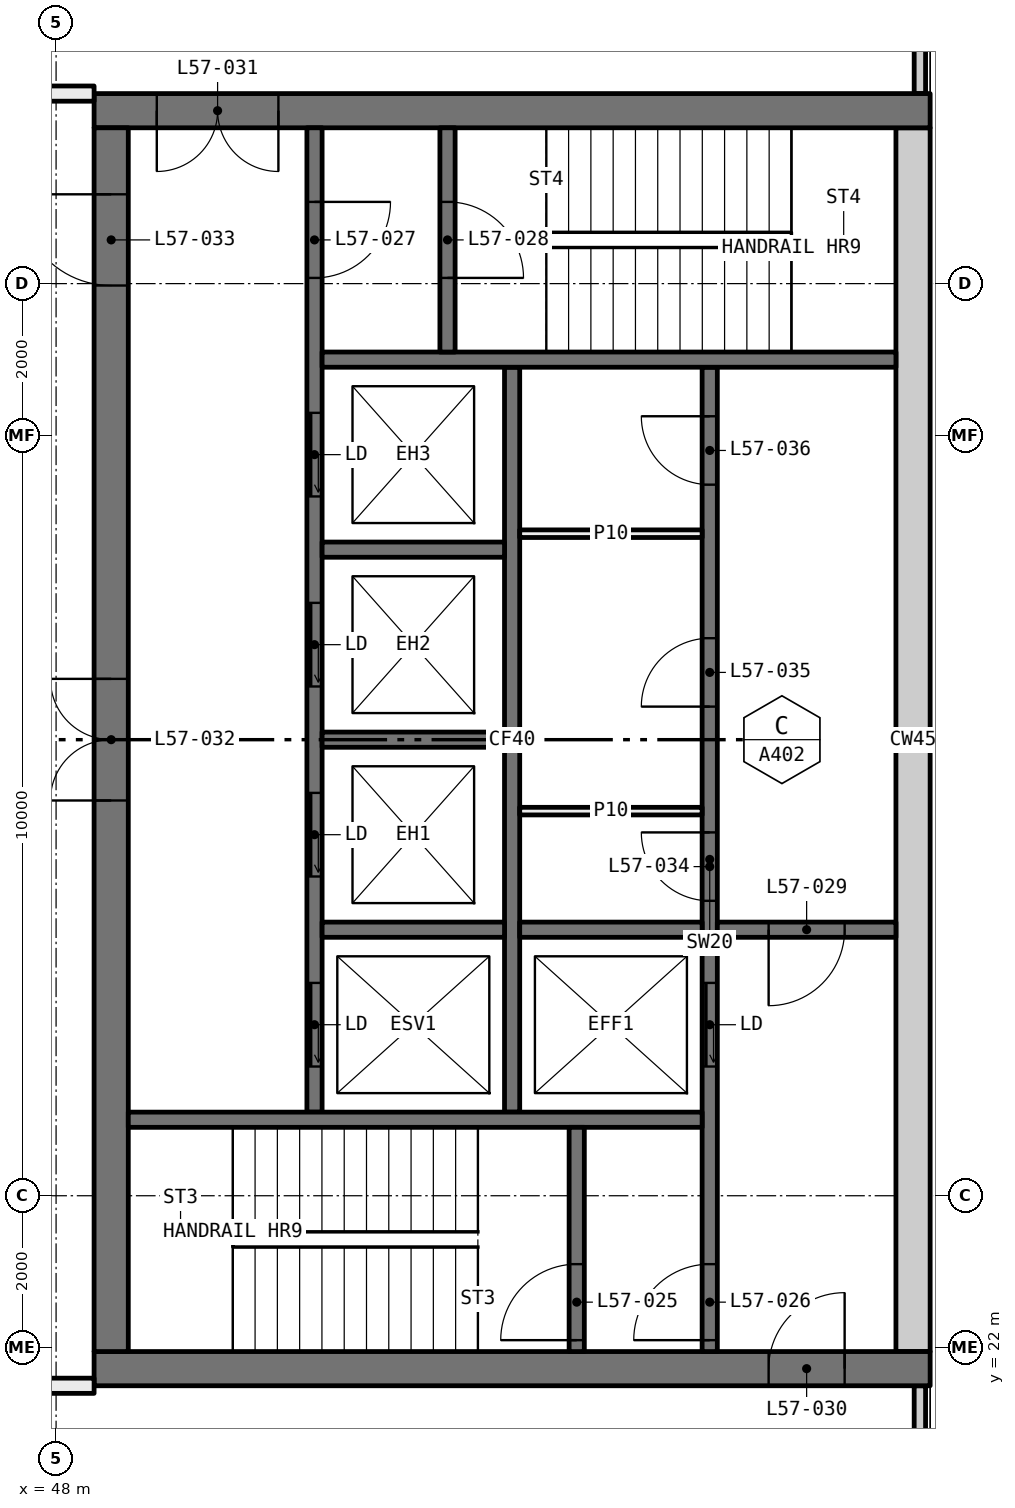
"""IFC4 building model, lengths in metres.
Left out: names, types, materials, properties, quantities, classifications, styles, units other than length and angle.
Written with IfcOpenShell. Run it as: python <this file> out.ifc"""

import sys

from ifc_helpers import new_model, si_unit, direction, frame, frame_2d, origin, place, context, subcontext, project, spatial, rectangle, extrude, element, fill, save


model = new_model("IFC4")
c1 = context("Model", 3, precision=1e-05, world=origin(), true_north=direction((0.0, 1.0)))
c2 = subcontext(c1, "Body", "Model", "MODEL_VIEW")
j1 = project(units=[si_unit("LENGTHUNIT", "METRE"), si_unit("PLANEANGLEUNIT", "RADIAN")], contexts=[c1])
p1 = place(None, origin())
s1 = spatial("IfcSite", under=j1, at=p1, CompositionType="ELEMENT")
p2 = place(p1, origin())
s2 = spatial("IfcBuilding", under=s1, at=p2, CompositionType="ELEMENT")
p3 = place(p2, frame((0.0, 0.0, 213.45)))
s3 = spatial("IfcBuildingStorey", under=s2, at=p3, CompositionType="ELEMENT", Elevation=213.45)
for number, where, z_axis, x_axis in (
    (1, (59.365, 18.71, 0.0), (0.0, 0.0, 1.0), (0.0, 1.0, 0.0)),
    (2, (59.365, 38.5, 0.0), (0.0, 0.0, 1.0), (0.0, 1.0, 0.0)),
):
    element("IfcWall", number, at=place(p3, frame(where, z_axis=z_axis, x_axis=x_axis)), inside=s3, PredefinedType="ELEMENTEDWALL", context=c2, shape_type="SweptSolid", body=[
        extrude(rectangle(XDim=2.79, YDim=0.15, at=frame_2d((1.395, 0.0))), origin(), (0.0, 0.0, 1.0), 4.1),
    ])
p4 = place(p3, frame((48.5, 21.5, 0.0), z_axis=(0.0, 0.0, 1.0), x_axis=(-1.0, 0.0, 0.0)))
e3 = element("IfcWall", 3, at=p4, inside=s3, PredefinedType="PARTITIONING", context=c2, shape_type="SweptSolid", body=[
    extrude(rectangle(XDim=6.0, YDim=0.2, at=frame_2d((3.0, 0.0))), origin(), (0.0, 0.0, 1.0), 4.1),
])
p5 = place(p3, frame((42.6, 38.5, 0.0), z_axis=(0.0, 0.0, 1.0), x_axis=(1.0, 0.0, 0.0)))
e4 = element("IfcWall", 4, at=p5, inside=s3, PredefinedType="PARTITIONING", context=c2, shape_type="SweptSolid", body=[
    extrude(rectangle(XDim=5.9, YDim=0.2, at=frame_2d((2.95, 0.0))), origin(), (0.0, 0.0, 1.0), 4.1),
])
p6 = place(p3, frame((59.5, 21.725, 0.0), z_axis=(0.0, 0.0, 1.0), x_axis=(-1.0, 0.0, 0.0)))
e5 = element("IfcWall", 5, at=p6, inside=s3, PredefinedType="SHEAR", context=c2, shape_type="SweptSolid", body=[
    extrude(rectangle(XDim=11.0, YDim=0.45, at=frame_2d((5.5, 0.0))), origin(), (0.0, 0.0, 1.0), 4.1),
])
p7 = place(p6, frame((1.125, 0.0, 0.0)))
e6 = element("IfcOpeningElement", 6, at=p7, cuts=e5, PredefinedType="OPENING", context=c2, shape_type="SweptSolid", body=[
    extrude(rectangle(XDim=1.0, YDim=2.1, at=frame_2d((0.5, 1.05))), frame((0.0, 0.235, 0.0), z_axis=(0.0, -1.0, 0.0), x_axis=(1.0, 0.0, 0.0)), (0.0, 0.0, 1.0), 0.47),
])
p8 = place(p3, frame((59.5, 38.275, 0.0), z_axis=(0.0, 0.0, 1.0), x_axis=(-1.0, 0.0, 0.0)))
e7 = element("IfcWall", 7, at=p8, inside=s3, PredefinedType="SHEAR", context=c2, shape_type="SweptSolid", body=[
    extrude(rectangle(XDim=11.0, YDim=0.45, at=frame_2d((5.5, 0.0))), origin(), (0.0, 0.0, 1.0), 4.1),
])
p9 = place(p8, frame((8.575, 0.0, 0.0)))
e8 = element("IfcOpeningElement", 8, at=p9, cuts=e7, PredefinedType="OPENING", context=c2, shape_type="SweptSolid", body=[
    extrude(rectangle(XDim=1.6, YDim=2.1, at=frame_2d((0.8, 1.05))), frame((0.0, 0.235, 0.0), z_axis=(0.0, -1.0, 0.0), x_axis=(1.0, 0.0, 0.0)), (0.0, 0.0, 1.0), 0.47),
])
p10 = place(p3, frame((59.275, 21.95, 0.0), z_axis=(0.0, 0.0, 1.0), x_axis=(0.0, 1.0, 0.0)))
e9 = element("IfcWall", 9, at=p10, inside=s3, PredefinedType="SHEAR", context=c2, shape_type="SweptSolid", body=[
    extrude(rectangle(XDim=16.1, YDim=0.45, at=frame_2d((8.05, 0.0))), origin(), (0.0, 0.0, 1.0), 4.1),
])
p11 = place(p3, frame((48.725, 21.95, 0.0), z_axis=(0.0, 0.0, 1.0), x_axis=(0.0, 1.0, 0.0)))
e10 = element("IfcWall", 10, at=p11, inside=s3, PredefinedType="SHEAR", context=c2, shape_type="SweptSolid", body=[
    extrude(rectangle(XDim=16.1, YDim=0.45, at=frame_2d((8.05, 0.0))), origin(), (0.0, 0.0, 1.0), 4.1),
])
p12 = place(p11, frame((7.25, 0.0, 0.0)))
e11 = element("IfcOpeningElement", 11, at=p12, cuts=e10, PredefinedType="OPENING", context=c2, shape_type="SweptSolid", body=[
    extrude(rectangle(XDim=1.6, YDim=2.1, at=frame_2d((0.8, 1.05))), frame((0.0, 0.235, 0.0), z_axis=(0.0, -1.0, 0.0), x_axis=(1.0, 0.0, 0.0)), (0.0, 0.0, 1.0), 0.47),
])
p13 = place(p11, frame((14.025, 0.0, 0.0)))
e12 = element("IfcOpeningElement", 12, at=p13, cuts=e10, PredefinedType="OPENING", context=c2, shape_type="SweptSolid", body=[
    extrude(rectangle(XDim=1.2, YDim=2.1, at=frame_2d((0.6, 1.05))), frame((0.0, 0.235, 0.0), z_axis=(0.0, -1.0, 0.0), x_axis=(1.0, 0.0, 0.0)), (0.0, 0.0, 1.0), 0.47),
])
p14 = place(p3, frame((56.6, 21.95, 0.0), z_axis=(0.0, 0.0, 1.0), x_axis=(0.0, 1.0, 0.0)))
e13 = element("IfcWall", 13, at=p14, inside=s3, PredefinedType="SOLIDWALL", context=c2, shape_type="SweptSolid", body=[
    extrude(rectangle(XDim=12.95, YDim=0.2, at=frame_2d((6.475, 0.0))), origin(), (0.0, 0.0, 1.0), 4.1),
])
p15 = place(p14, frame((3.75, 0.0, 0.0)))
e14 = element("IfcOpeningElement", 14, at=p15, cuts=e13, PredefinedType="OPENING", context=c2, shape_type="SweptSolid", body=[
    extrude(rectangle(XDim=1.1, YDim=2.1, at=frame_2d((0.55, 1.05))), frame((0.0, 0.11, 0.0), z_axis=(0.0, -1.0, 0.0), x_axis=(1.0, 0.0, 0.0)), (0.0, 0.0, 1.0), 0.22),
])
p16 = place(p14, frame((0.15, 0.0, 0.0)))
e15 = element("IfcOpeningElement", 15, at=p16, cuts=e13, PredefinedType="OPENING", context=c2, shape_type="SweptSolid", body=[
    extrude(rectangle(XDim=1.0, YDim=2.1, at=frame_2d((0.5, 1.05))), frame((0.0, 0.11, 0.0), z_axis=(0.0, -1.0, 0.0), x_axis=(1.0, 0.0, 0.0)), (0.0, 0.0, 1.0), 0.22),
])
p17 = place(p14, frame((5.93, 0.0, 0.0)))
e16 = element("IfcOpeningElement", 16, at=p17, cuts=e13, PredefinedType="OPENING", context=c2, shape_type="SweptSolid", body=[
    extrude(rectangle(XDim=0.9, YDim=2.1, at=frame_2d((0.45, 1.05))), frame((0.0, 0.11, 0.0), z_axis=(0.0, -1.0, 0.0), x_axis=(1.0, 0.0, 0.0)), (0.0, 0.0, 1.0), 0.22),
])
p18 = place(p14, frame((8.485, 0.0, 0.0)))
e17 = element("IfcOpeningElement", 17, at=p18, cuts=e13, PredefinedType="OPENING", context=c2, shape_type="SweptSolid", body=[
    extrude(rectangle(XDim=0.9, YDim=2.1, at=frame_2d((0.45, 1.05))), frame((0.0, 0.11, 0.0), z_axis=(0.0, -1.0, 0.0), x_axis=(1.0, 0.0, 0.0)), (0.0, 0.0, 1.0), 0.22),
])
p19 = place(p14, frame((11.405, 0.0, 0.0)))
e18 = element("IfcOpeningElement", 18, at=p19, cuts=e13, PredefinedType="OPENING", context=c2, shape_type="SweptSolid", body=[
    extrude(rectangle(XDim=0.9, YDim=2.1, at=frame_2d((0.45, 1.05))), frame((0.0, 0.11, 0.0), z_axis=(0.0, -1.0, 0.0), x_axis=(1.0, 0.0, 0.0)), (0.0, 0.0, 1.0), 0.22),
])
p20 = place(p3, frame((51.4, 25.1, 0.0), z_axis=(0.0, 0.0, 1.0), x_axis=(0.0, 1.0, 0.0)))
e19 = element("IfcWall", 19, at=p20, inside=s3, PredefinedType="SOLIDWALL", context=c2, shape_type="SweptSolid", body=[
    extrude(rectangle(XDim=12.95, YDim=0.2, at=frame_2d((6.475, 0.0))), origin(), (0.0, 0.0, 1.0), 4.1),
])
p21 = place(p20, frame((0.6, 0.0, 0.0)))
e20 = element("IfcOpeningElement", 20, at=p21, cuts=e19, PredefinedType="OPENING", context=c2, shape_type="SweptSolid", body=[
    extrude(rectangle(XDim=1.1, YDim=2.1, at=frame_2d((0.55, 1.05))), frame((0.0, 0.11, 0.0), z_axis=(0.0, -1.0, 0.0), x_axis=(1.0, 0.0, 0.0)), (0.0, 0.0, 1.0), 0.22),
])
p22 = place(p20, frame((3.1, 0.0, 0.0)))
e21 = element("IfcOpeningElement", 21, at=p22, cuts=e19, PredefinedType="OPENING", context=c2, shape_type="SweptSolid", body=[
    extrude(rectangle(XDim=1.1, YDim=2.1, at=frame_2d((0.55, 1.05))), frame((0.0, 0.11, 0.0), z_axis=(0.0, -1.0, 0.0), x_axis=(1.0, 0.0, 0.0)), (0.0, 0.0, 1.0), 0.22),
])
p23 = place(p20, frame((5.6, 0.0, 0.0)))
e22 = element("IfcOpeningElement", 22, at=p23, cuts=e19, PredefinedType="OPENING", context=c2, shape_type="SweptSolid", body=[
    extrude(rectangle(XDim=1.1, YDim=2.1, at=frame_2d((0.55, 1.05))), frame((0.0, 0.11, 0.0), z_axis=(0.0, -1.0, 0.0), x_axis=(1.0, 0.0, 0.0)), (0.0, 0.0, 1.0), 0.22),
])
p24 = place(p20, frame((8.1, 0.0, 0.0)))
e23 = element("IfcOpeningElement", 23, at=p24, cuts=e19, PredefinedType="OPENING", context=c2, shape_type="SweptSolid", body=[
    extrude(rectangle(XDim=1.1, YDim=2.1, at=frame_2d((0.55, 1.05))), frame((0.0, 0.11, 0.0), z_axis=(0.0, -1.0, 0.0), x_axis=(1.0, 0.0, 0.0)), (0.0, 0.0, 1.0), 0.22),
])
p25 = place(p20, frame((10.975, 0.0, 0.0)))
e24 = element("IfcOpeningElement", 24, at=p25, cuts=e19, PredefinedType="OPENING", context=c2, shape_type="SweptSolid", body=[
    extrude(rectangle(XDim=1.0, YDim=2.1, at=frame_2d((0.5, 1.05))), frame((0.0, 0.11, 0.0), z_axis=(0.0, -1.0, 0.0), x_axis=(1.0, 0.0, 0.0)), (0.0, 0.0, 1.0), 0.22),
])
p26 = place(p3, frame((54.0, 25.1, 0.0), z_axis=(0.0, 0.0, 1.0), x_axis=(0.0, 1.0, 0.0)))
e25 = element("IfcWall", 25, at=p26, inside=s3, PredefinedType="SOLIDWALL", context=c2, shape_type="SweptSolid", body=[
    extrude(rectangle(XDim=9.8, YDim=0.2, at=frame_2d((4.9, 0.0))), origin(), (0.0, 0.0, 1.0), 4.1),
])
for number, where, z_axis, x_axis in (
    (26, (56.5, 25.0, 0.0), (0.0, 0.0, 1.0), (-1.0, 0.0, 0.0)),
    (27, (59.05, 35.0, 0.0), (0.0, 0.0, 1.0), (-1.0, 0.0, 0.0)),
):
    element("IfcWall", number, at=place(p3, frame(where, z_axis=z_axis, x_axis=x_axis)), inside=s3, PredefinedType="SOLIDWALL", context=c2, shape_type="SweptSolid", body=[
        extrude(rectangle(XDim=7.55, YDim=0.2, at=frame_2d((3.775, 0.0))), origin(), (0.0, 0.0, 1.0), 4.1),
    ])
p27 = place(p3, frame((59.05, 27.5, 0.0), z_axis=(0.0, 0.0, 1.0), x_axis=(-1.0, 0.0, 0.0)))
e28 = element("IfcWall", 28, at=p27, inside=s3, PredefinedType="SOLIDWALL", context=c2, shape_type="SweptSolid", body=[
    extrude(rectangle(XDim=2.35, YDim=0.2, at=frame_2d((1.175, 0.0))), origin(), (0.0, 0.0, 1.0), 4.1),
])
p28 = place(p27, frame((0.675, 0.0, 0.0)))
e29 = element("IfcOpeningElement", 29, at=p28, cuts=e28, PredefinedType="OPENING", context=c2, shape_type="SweptSolid", body=[
    extrude(rectangle(XDim=1.0, YDim=2.1, at=frame_2d((0.5, 1.05))), frame((0.0, 0.11, 0.0), z_axis=(0.0, -1.0, 0.0), x_axis=(1.0, 0.0, 0.0)), (0.0, 0.0, 1.0), 0.22),
])
p29 = place(p3, frame((54.85, 21.95, 0.0), z_axis=(0.0, 0.0, 1.0), x_axis=(0.0, 1.0, 0.0)))
e30 = element("IfcWall", 30, at=p29, inside=s3, PredefinedType="SOLIDWALL", context=c2, shape_type="SweptSolid", body=[
    extrude(rectangle(XDim=2.95, YDim=0.2, at=frame_2d((1.475, 0.0))), origin(), (0.0, 0.0, 1.0), 4.1),
])
p30 = place(p29, frame((0.15, 0.0, 0.0)))
e31 = element("IfcOpeningElement", 31, at=p30, cuts=e30, PredefinedType="OPENING", context=c2, shape_type="SweptSolid", body=[
    extrude(rectangle(XDim=1.0, YDim=2.1, at=frame_2d((0.5, 1.05))), frame((0.0, 0.11, 0.0), z_axis=(0.0, -1.0, 0.0), x_axis=(1.0, 0.0, 0.0)), (0.0, 0.0, 1.0), 0.22),
])
p31 = place(p3, frame((53.15, 35.1, 0.0), z_axis=(0.0, 0.0, 1.0), x_axis=(0.0, 1.0, 0.0)))
e32 = element("IfcWall", 32, at=p31, inside=s3, PredefinedType="SOLIDWALL", context=c2, shape_type="SweptSolid", body=[
    extrude(rectangle(XDim=2.95, YDim=0.2, at=frame_2d((1.475, 0.0))), origin(), (0.0, 0.0, 1.0), 4.1),
])
p32 = place(p31, frame((0.975, 0.0, 0.0)))
e33 = element("IfcOpeningElement", 33, at=p32, cuts=e32, PredefinedType="OPENING", context=c2, shape_type="SweptSolid", body=[
    extrude(rectangle(XDim=1.0, YDim=2.1, at=frame_2d((0.5, 1.05))), frame((0.0, 0.11, 0.0), z_axis=(0.0, -1.0, 0.0), x_axis=(1.0, 0.0, 0.0)), (0.0, 0.0, 1.0), 0.22),
])
for number, where, z_axis, x_axis in (
    (34, (56.5, 27.5, 0.0), (0.0, 0.0, 1.0), (-1.0, 0.0, 0.0)),
    (35, (53.9, 27.5, 0.0), (0.0, 0.0, 1.0), (-1.0, 0.0, 0.0)),
    (36, (53.9, 30.0, 0.0), (0.0, 0.0, 1.0), (-1.0, 0.0, 0.0)),
    (37, (53.9, 32.5, 0.0), (0.0, 0.0, 1.0), (-1.0, 0.0, 0.0)),
):
    element("IfcWall", number, at=place(p3, frame(where, z_axis=z_axis, x_axis=x_axis)), inside=s3, PredefinedType="SOLIDWALL", context=c2, shape_type="SweptSolid", body=[
        extrude(rectangle(XDim=2.4, YDim=0.2, at=frame_2d((1.2, 0.0))), origin(), (0.0, 0.0, 1.0), 4.1),
    ])
for number, where, z_axis, x_axis in (
    (38, (56.5, 29.06, 0.0), (0.0, 0.0, 1.0), (-1.0, 0.0, 0.0)),
    (39, (56.5, 32.71, 0.0), (0.0, 0.0, 1.0), (-1.0, 0.0, 0.0)),
):
    element("IfcWall", number, at=place(p3, frame(where, z_axis=z_axis, x_axis=x_axis)), inside=s3, PredefinedType="PARTITIONING", context=c2, shape_type="SweptSolid", body=[
        extrude(rectangle(XDim=2.4, YDim=0.1, at=frame_2d((1.2, 0.0))), origin(), (0.0, 0.0, 1.0), 4.1),
    ])
p33 = place(p21, origin())
e40 = element("IfcDoor", 40, at=p33, inside=s3, OperationType="SLIDING_TO_LEFT", PredefinedType="DOOR", context=c2, shape_type="SweptSolid", body=[
    extrude(rectangle(XDim=1.1, YDim=2.1, at=frame_2d((0.55, 1.05))), frame((0.0, 0.025, 0.0), z_axis=(0.0, -1.0, 0.0), x_axis=(1.0, 0.0, 0.0)), (0.0, 0.0, 1.0), 0.05),
])
fill(e20, e40)
p34 = place(p22, origin())
e41 = element("IfcDoor", 41, at=p34, inside=s3, OperationType="SLIDING_TO_LEFT", PredefinedType="DOOR", context=c2, shape_type="SweptSolid", body=[
    extrude(rectangle(XDim=1.1, YDim=2.1, at=frame_2d((0.55, 1.05))), frame((0.0, 0.025, 0.0), z_axis=(0.0, -1.0, 0.0), x_axis=(1.0, 0.0, 0.0)), (0.0, 0.0, 1.0), 0.05),
])
fill(e21, e41)
p35 = place(p23, origin())
e42 = element("IfcDoor", 42, at=p35, inside=s3, OperationType="SLIDING_TO_LEFT", PredefinedType="DOOR", context=c2, shape_type="SweptSolid", body=[
    extrude(rectangle(XDim=1.1, YDim=2.1, at=frame_2d((0.55, 1.05))), frame((0.0, 0.025, 0.0), z_axis=(0.0, -1.0, 0.0), x_axis=(1.0, 0.0, 0.0)), (0.0, 0.0, 1.0), 0.05),
])
fill(e22, e42)
p36 = place(p24, origin())
e43 = element("IfcDoor", 43, at=p36, inside=s3, OperationType="SLIDING_TO_LEFT", PredefinedType="DOOR", context=c2, shape_type="SweptSolid", body=[
    extrude(rectangle(XDim=1.1, YDim=2.1, at=frame_2d((0.55, 1.05))), frame((0.0, 0.025, 0.0), z_axis=(0.0, -1.0, 0.0), x_axis=(1.0, 0.0, 0.0)), (0.0, 0.0, 1.0), 0.05),
])
fill(e23, e43)
p37 = place(p15, origin())
e44 = element("IfcDoor", 44, at=p37, inside=s3, OperationType="SLIDING_TO_LEFT", PredefinedType="DOOR", context=c2, shape_type="SweptSolid", body=[
    extrude(rectangle(XDim=1.1, YDim=2.1, at=frame_2d((0.55, 1.05))), frame((0.0, 0.025, 0.0), z_axis=(0.0, -1.0, 0.0), x_axis=(1.0, 0.0, 0.0)), (0.0, 0.0, 1.0), 0.05),
])
fill(e14, e44)
p38 = place(p30, origin())
e45 = element("IfcDoor", 45, at=p38, inside=s3, OperationType="SINGLE_SWING_RIGHT", PredefinedType="DOOR", context=c2, shape_type="SweptSolid", body=[
    extrude(rectangle(XDim=1.0, YDim=2.1, at=frame_2d((0.5, 1.05))), frame((0.0, 0.025, 0.0), z_axis=(0.0, -1.0, 0.0), x_axis=(1.0, 0.0, 0.0)), (0.0, 0.0, 1.0), 0.05),
])
fill(e31, e45)
p39 = place(p16, origin())
e46 = element("IfcDoor", 46, at=p39, inside=s3, OperationType="SINGLE_SWING_RIGHT", PredefinedType="DOOR", context=c2, shape_type="SweptSolid", body=[
    extrude(rectangle(XDim=1.0, YDim=2.1, at=frame_2d((0.5, 1.05))), frame((0.0, 0.025, 0.0), z_axis=(0.0, -1.0, 0.0), x_axis=(1.0, 0.0, 0.0)), (0.0, 0.0, 1.0), 0.05),
])
fill(e15, e46)
p40 = place(p25, frame((1.0, 0.0, 0.0), x_axis=(-1.0, 0.0, 0.0)))
e47 = element("IfcDoor", 47, at=p40, inside=s3, OperationType="SINGLE_SWING_RIGHT", PredefinedType="DOOR", context=c2, shape_type="SweptSolid", body=[
    extrude(rectangle(XDim=1.0, YDim=2.1, at=frame_2d((0.5, 1.05))), frame((0.0, 0.025, 0.0), z_axis=(0.0, -1.0, 0.0), x_axis=(1.0, 0.0, 0.0)), (0.0, 0.0, 1.0), 0.05),
])
fill(e24, e47)
p41 = place(p32, frame((1.0, 0.0, 0.0), x_axis=(-1.0, 0.0, 0.0)))
e48 = element("IfcDoor", 48, at=p41, inside=s3, OperationType="SINGLE_SWING_LEFT", PredefinedType="DOOR", context=c2, shape_type="SweptSolid", body=[
    extrude(rectangle(XDim=1.0, YDim=2.1, at=frame_2d((0.5, 1.05))), frame((0.0, 0.025, 0.0), z_axis=(0.0, -1.0, 0.0), x_axis=(1.0, 0.0, 0.0)), (0.0, 0.0, 1.0), 0.05),
])
fill(e33, e48)
p42 = place(p28, origin())
e49 = element("IfcDoor", 49, at=p42, inside=s3, OperationType="SINGLE_SWING_LEFT", PredefinedType="DOOR", context=c2, shape_type="SweptSolid", body=[
    extrude(rectangle(XDim=1.0, YDim=2.1, at=frame_2d((0.5, 1.05))), frame((0.0, 0.025, 0.0), z_axis=(0.0, -1.0, 0.0), x_axis=(1.0, 0.0, 0.0)), (0.0, 0.0, 1.0), 0.05),
])
fill(e29, e49)
p43 = place(p7, frame((1.0, 0.0, 0.0), x_axis=(-1.0, 0.0, 0.0)))
e50 = element("IfcDoor", 50, at=p43, inside=s3, OperationType="SINGLE_SWING_LEFT", PredefinedType="DOOR", context=c2, shape_type="SweptSolid", body=[
    extrude(rectangle(XDim=1.0, YDim=2.1, at=frame_2d((0.5, 1.05))), frame((0.0, 0.025, 0.0), z_axis=(0.0, -1.0, 0.0), x_axis=(1.0, 0.0, 0.0)), (0.0, 0.0, 1.0), 0.05),
])
fill(e6, e50)
p44 = place(p9, origin())
e51 = element("IfcDoor", 51, at=p44, inside=s3, OperationType="DOUBLE_DOOR_SINGLE_SWING", PredefinedType="DOOR", context=c2, shape_type="SweptSolid", body=[
    extrude(rectangle(XDim=1.6, YDim=2.1, at=frame_2d((0.8, 1.05))), frame((0.0, 0.025, 0.0), z_axis=(0.0, -1.0, 0.0), x_axis=(1.0, 0.0, 0.0)), (0.0, 0.0, 1.0), 0.05),
])
fill(e8, e51)
p45 = place(p12, origin())
e52 = element("IfcDoor", 52, at=p45, inside=s3, OperationType="DOUBLE_DOOR_SINGLE_SWING", PredefinedType="DOOR", context=c2, shape_type="SweptSolid", body=[
    extrude(rectangle(XDim=1.6, YDim=2.1, at=frame_2d((0.8, 1.05))), frame((0.0, 0.025, 0.0), z_axis=(0.0, -1.0, 0.0), x_axis=(1.0, 0.0, 0.0)), (0.0, 0.0, 1.0), 0.05),
])
fill(e11, e52)
p46 = place(p13, origin())
e53 = element("IfcDoor", 53, at=p46, inside=s3, OperationType="SINGLE_SWING_LEFT", PredefinedType="DOOR", context=c2, shape_type="SweptSolid", body=[
    extrude(rectangle(XDim=1.2, YDim=2.1, at=frame_2d((0.6, 1.05))), frame((0.0, 0.025, 0.0), z_axis=(0.0, -1.0, 0.0), x_axis=(1.0, 0.0, 0.0)), (0.0, 0.0, 1.0), 0.05),
])
fill(e12, e53)
p47 = place(p17, origin())
e54 = element("IfcDoor", 54, at=p47, inside=s3, OperationType="SINGLE_SWING_LEFT", PredefinedType="DOOR", context=c2, shape_type="SweptSolid", body=[
    extrude(rectangle(XDim=0.9, YDim=2.1, at=frame_2d((0.45, 1.05))), frame((0.0, 0.025, 0.0), z_axis=(0.0, -1.0, 0.0), x_axis=(1.0, 0.0, 0.0)), (0.0, 0.0, 1.0), 0.05),
])
fill(e16, e54)
p48 = place(p18, origin())
e55 = element("IfcDoor", 55, at=p48, inside=s3, OperationType="SINGLE_SWING_RIGHT", PredefinedType="DOOR", context=c2, shape_type="SweptSolid", body=[
    extrude(rectangle(XDim=0.9, YDim=2.1, at=frame_2d((0.45, 1.05))), frame((0.0, 0.025, 0.0), z_axis=(0.0, -1.0, 0.0), x_axis=(1.0, 0.0, 0.0)), (0.0, 0.0, 1.0), 0.05),
])
fill(e17, e55)
p49 = place(p19, origin())
e56 = element("IfcDoor", 56, at=p49, inside=s3, OperationType="SINGLE_SWING_LEFT", PredefinedType="DOOR", context=c2, shape_type="SweptSolid", body=[
    extrude(rectangle(XDim=0.9, YDim=2.1, at=frame_2d((0.45, 1.05))), frame((0.0, 0.025, 0.0), z_axis=(0.0, -1.0, 0.0), x_axis=(1.0, 0.0, 0.0)), (0.0, 0.0, 1.0), 0.05),
])
fill(e18, e56)
save(model, sys.argv[1])
